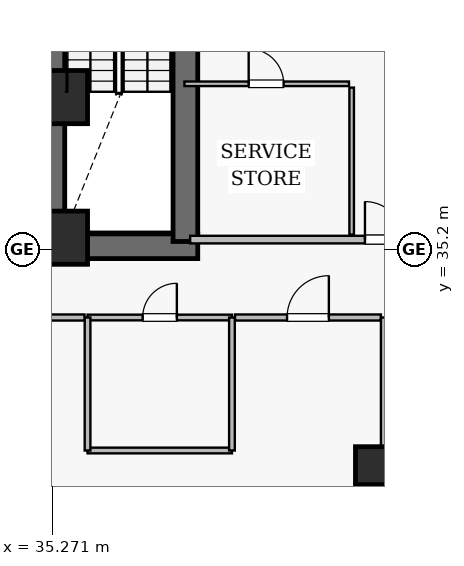
"""IFC4 building model, lengths in metres.
Left out: names, types, materials, properties, quantities, classifications, styles, units other than length and angle.
Written with IfcOpenShell. Run it as: python <this file> out.ifc"""

import sys

from ifc_helpers import new_model, si_unit, direction, frame, frame_2d, origin, origin_2d, place, context, subcontext, project, spatial, rectangle, extrude, element, fill, save


model = new_model("IFC4")
c1 = context("Model", 3, precision=1e-05, world=origin(), true_north=direction((0.0, 1.0)))
c2 = subcontext(c1, "Body", "Model", "MODEL_VIEW")
j1 = project(units=[si_unit("LENGTHUNIT", "METRE"), si_unit("PLANEANGLEUNIT", "RADIAN")], contexts=[c1])
p1 = place(None, origin())
s1 = spatial("IfcSite", under=j1, at=p1, CompositionType="ELEMENT")
p2 = place(p1, origin())
s2 = spatial("IfcBuilding", under=s1, at=p2, CompositionType="ELEMENT")
p3 = place(p2, origin())
s3 = spatial("IfcBuildingStorey", under=s2, at=p3, CompositionType="ELEMENT", Elevation=0.0)
p4 = place(p3, frame((34.95, 35.275, 0.0), z_axis=(0.0, 0.0, 1.0), x_axis=(1.0, 0.0, 0.0)))
e1 = element("IfcWall", 1, at=p4, inside=s3, PredefinedType="SHEAR", context=c2, shape_type="SweptSolid", body=[
    extrude(rectangle(XDim=4.15, YDim=0.65, at=frame_2d((2.075, 0.0))), origin(), (0.0, 0.0, 1.0), 4.5),
])
p5 = place(p3, frame((35.275, 34.95, 0.0), z_axis=(0.0, 0.0, 1.0), x_axis=(0.0, 1.0, 0.0)))
e2 = element("IfcWall", 2, at=p5, inside=s3, PredefinedType="SHEAR", context=c2, shape_type="SweptSolid", body=[
    extrude(rectangle(XDim=9.4, YDim=0.65, at=frame_2d((4.7, 0.0))), origin(), (0.0, 0.0, 1.0), 4.5),
])
p6 = place(p3, frame((38.775, 35.4, 0.0), z_axis=(0.0, 0.0, 1.0), x_axis=(0.0, 1.0, 0.0)))
e3 = element("IfcWall", 3, at=p6, inside=s3, PredefinedType="SHEAR", context=c2, shape_type="SweptSolid", body=[
    extrude(rectangle(XDim=8.95, YDim=0.65, at=frame_2d((4.475, 0.0))), origin(), (0.0, 0.0, 1.0), 4.5),
])
for number, where, z_axis, x_axis in (
    (4, (35.5, 35.5, 0.0), (0.0, 0.0, 1.0), (1.0, 0.0, 0.0)),
    (5, (35.5, 39.2, 0.0), (0.0, 0.0, 1.0), (1.0, 0.0, 0.0)),
):
    element("IfcColumn", number, at=place(p3, frame(where, z_axis=z_axis, x_axis=x_axis)), inside=s3, PredefinedType="COLUMN", context=c2, shape_type="SweptSolid", body=[
        extrude(rectangle(XDim=1.4, YDim=1.4, at=origin_2d()), origin(), (0.0, 0.0, 1.0), 4.8),
    ])
p7 = place(p3, frame((44.0, 29.5, 0.0), z_axis=(0.0, 0.0, 1.0), x_axis=(1.0, 0.0, 0.0)))
e6 = element("IfcColumn", 6, at=p7, inside=s3, PredefinedType="COLUMN", context=c2, shape_type="SweptSolid", body=[
    extrude(rectangle(XDim=1.5, YDim=1.0, at=origin_2d()), origin(), (0.0, 0.0, 1.0), 4.8),
])
p8 = place(p3, frame((38.9, 35.45, 0.0), z_axis=(0.0, 0.0, 1.0), x_axis=(1.0, 0.0, 0.0)))
e7 = element("IfcWall", 7, at=p8, inside=s3, PredefinedType="SOLIDWALL", context=c2, shape_type="SweptSolid", body=[
    extrude(rectangle(XDim=10.2, YDim=0.2, at=frame_2d((5.1, 0.0))), origin(), (0.0, 0.0, 1.0), 4.5),
])
p9 = place(p8, frame((4.6, 0.0, 0.0)))
e8 = element("IfcOpeningElement", 8, at=p9, cuts=e7, PredefinedType="OPENING", context=c2, shape_type="SweptSolid", body=[
    extrude(rectangle(XDim=1.0, YDim=2.15, at=frame_2d((0.5, 1.075))), frame((0.0, 0.11, 0.0), z_axis=(0.0, -1.0, 0.0), x_axis=(1.0, 0.0, 0.0)), (0.0, 0.0, 1.0), 0.22),
])
p10 = place(p3, frame((38.75, 39.55, 0.0), z_axis=(0.0, 0.0, 1.0), x_axis=(1.0, 0.0, 0.0)))
e9 = element("IfcWall", 9, at=p10, inside=s3, PredefinedType="PARTITIONING", context=c2, shape_type="SweptSolid", body=[
    extrude(rectangle(XDim=4.33, YDim=0.12, at=frame_2d((2.165, 0.0))), origin(), (0.0, 0.0, 1.0), 4.5),
])
p11 = place(p10, frame((1.69, 0.0, 0.0)))
e10 = element("IfcOpeningElement", 10, at=p11, cuts=e9, PredefinedType="OPENING", context=c2, shape_type="SweptSolid", body=[
    extrude(rectangle(XDim=0.92, YDim=2.1, at=frame_2d((0.46, 1.05))), frame((0.0, 0.07, 0.0), z_axis=(0.0, -1.0, 0.0), x_axis=(1.0, 0.0, 0.0)), (0.0, 0.0, 1.0), 0.14),
])
p12 = place(p3, frame((40.08, 33.4, 0.0), z_axis=(0.0, 0.0, 1.0), x_axis=(1.0, 0.0, 0.0)))
e11 = element("IfcWall", 11, at=p12, inside=s3, PredefinedType="SOLIDWALL", context=c2, shape_type="SweptSolid", body=[
    extrude(rectangle(XDim=3.84, YDim=0.16, at=frame_2d((1.92, 0.0))), origin(), (0.0, 0.0, 1.0), 4.5),
])
p13 = place(p12, frame((1.37, 0.0, 0.0)))
e12 = element("IfcOpeningElement", 12, at=p13, cuts=e11, PredefinedType="OPENING", context=c2, shape_type="SweptSolid", body=[
    extrude(rectangle(XDim=1.1, YDim=2.15, at=frame_2d((0.55, 1.075))), frame((0.0, 0.09, 0.0), z_axis=(0.0, -1.0, 0.0), x_axis=(1.0, 0.0, 0.0)), (0.0, 0.0, 1.0), 0.18),
])
p14 = place(p3, frame((36.2, 33.4, 0.0), z_axis=(0.0, 0.0, 1.0), x_axis=(1.0, 0.0, 0.0)))
e13 = element("IfcWall", 13, at=p14, inside=s3, PredefinedType="PLUMBINGWALL", context=c2, shape_type="SweptSolid", body=[
    extrude(rectangle(XDim=3.8, YDim=0.15, at=frame_2d((1.9, 0.0))), origin(), (0.0, 0.0, 1.0), 4.5),
])
p15 = place(p14, frame((1.45, 0.0, 0.0)))
e14 = element("IfcOpeningElement", 14, at=p15, cuts=e13, PredefinedType="OPENING", context=c2, shape_type="SweptSolid", body=[
    extrude(rectangle(XDim=0.9, YDim=2.1, at=frame_2d((0.45, 1.05))), frame((0.0, 0.085, 0.0), z_axis=(0.0, -1.0, 0.0), x_axis=(1.0, 0.0, 0.0)), (0.0, 0.0, 1.0), 0.17),
])
p16 = place(p3, frame((44.0, 13.489, 0.0), z_axis=(0.0, 0.0, 1.0), x_axis=(0.0, 1.0, 0.0)))
e15 = element("IfcWall", 15, at=p16, inside=s3, PredefinedType="SOLIDWALL", context=c2, shape_type="SweptSolid", body=[
    extrude(rectangle(XDim=19.911, YDim=0.16, at=frame_2d((9.956, 0.0))), origin(), (0.0, 0.0, 1.0), 4.088),
])
p17 = place(p3, frame((43.15, 35.58, 0.0), z_axis=(0.0, 0.0, 1.0), x_axis=(0.0, 1.0, 0.0)))
e16 = element("IfcWall", 16, at=p17, inside=s3, PredefinedType="PARTITIONING", context=c2, shape_type="SweptSolid", body=[
    extrude(rectangle(XDim=3.87, YDim=0.12, at=frame_2d((1.935, 0.0))), origin(), (0.0, 0.0, 1.0), 4.5),
])
p18 = place(p3, frame((36.2, 29.9, 0.0), z_axis=(0.0, 0.0, 1.0), x_axis=(1.0, 0.0, 0.0)))
e17 = element("IfcWall", 17, at=p18, inside=s3, PredefinedType="PLUMBINGWALL", context=c2, shape_type="SweptSolid", body=[
    extrude(rectangle(XDim=3.8, YDim=0.15, at=frame_2d((1.9, 0.0))), origin(), (0.0, 0.0, 1.0), 4.5),
])
for number, where, z_axis, x_axis in (
    (18, (36.2, 33.4, 0.0), (0.0, 0.0, 1.0), (0.0, -1.0, 0.0)),
    (19, (40.0, 29.9, 0.0), (0.0, 0.0, 1.0), (0.0, 1.0, 0.0)),
):
    element("IfcWall", number, at=place(p3, frame(where, z_axis=z_axis, x_axis=x_axis)), inside=s3, PredefinedType="PLUMBINGWALL", context=c2, shape_type="SweptSolid", body=[
        extrude(rectangle(XDim=3.5, YDim=0.15, at=frame_2d((1.75, 0.0))), origin(), (0.0, 0.0, 1.0), 4.5),
    ])
p19 = place(p3, frame((33.48, 33.4, 0.0), z_axis=(0.0, 0.0, 1.0), x_axis=(1.0, 0.0, 0.0)))
e20 = element("IfcWall", 20, at=p19, inside=s3, PredefinedType="SOLIDWALL", context=c2, shape_type="SweptSolid", body=[
    extrude(rectangle(XDim=2.64, YDim=0.16, at=frame_2d((1.32, 0.0))), origin(), (0.0, 0.0, 1.0), 4.5),
])
p20 = place(p9, origin())
e21 = element("IfcDoor", 21, at=p20, inside=s3, OperationType="SINGLE_SWING_LEFT", PredefinedType="DOOR", context=c2, shape_type="SweptSolid", body=[
    extrude(rectangle(XDim=1.0, YDim=2.15, at=frame_2d((0.5, 1.075))), frame((0.0, 0.025, 0.0), z_axis=(0.0, -1.0, 0.0), x_axis=(1.0, 0.0, 0.0)), (0.0, 0.0, 1.0), 0.05),
])
fill(e8, e21)
p21 = place(p11, origin())
e22 = element("IfcDoor", 22, at=p21, inside=s3, OperationType="SINGLE_SWING_LEFT", PredefinedType="DOOR", context=c2, shape_type="SweptSolid", body=[
    extrude(rectangle(XDim=0.92, YDim=2.1, at=frame_2d((0.46, 1.05))), frame((0.0, 0.025, 0.0), z_axis=(0.0, -1.0, 0.0), x_axis=(1.0, 0.0, 0.0)), (0.0, 0.0, 1.0), 0.05),
])
fill(e10, e22)
p22 = place(p15, origin())
e23 = element("IfcDoor", 23, at=p22, inside=s3, OperationType="SINGLE_SWING_RIGHT", PredefinedType="DOOR", context=c2, shape_type="SweptSolid", body=[
    extrude(rectangle(XDim=0.9, YDim=2.1, at=frame_2d((0.45, 1.05))), frame((0.0, 0.025, 0.0), z_axis=(0.0, -1.0, 0.0), x_axis=(1.0, 0.0, 0.0)), (0.0, 0.0, 1.0), 0.05),
])
fill(e14, e23)
p23 = place(p13, origin())
e24 = element("IfcDoor", 24, at=p23, inside=s3, OperationType="SINGLE_SWING_RIGHT", PredefinedType="DOOR", context=c2, shape_type="SweptSolid", body=[
    extrude(rectangle(XDim=1.1, YDim=2.15, at=frame_2d((0.55, 1.075))), frame((0.0, 0.025, 0.0), z_axis=(0.0, -1.0, 0.0), x_axis=(1.0, 0.0, 0.0)), (0.0, 0.0, 1.0), 0.05),
])
fill(e12, e24)
save(model, sys.argv[1])
